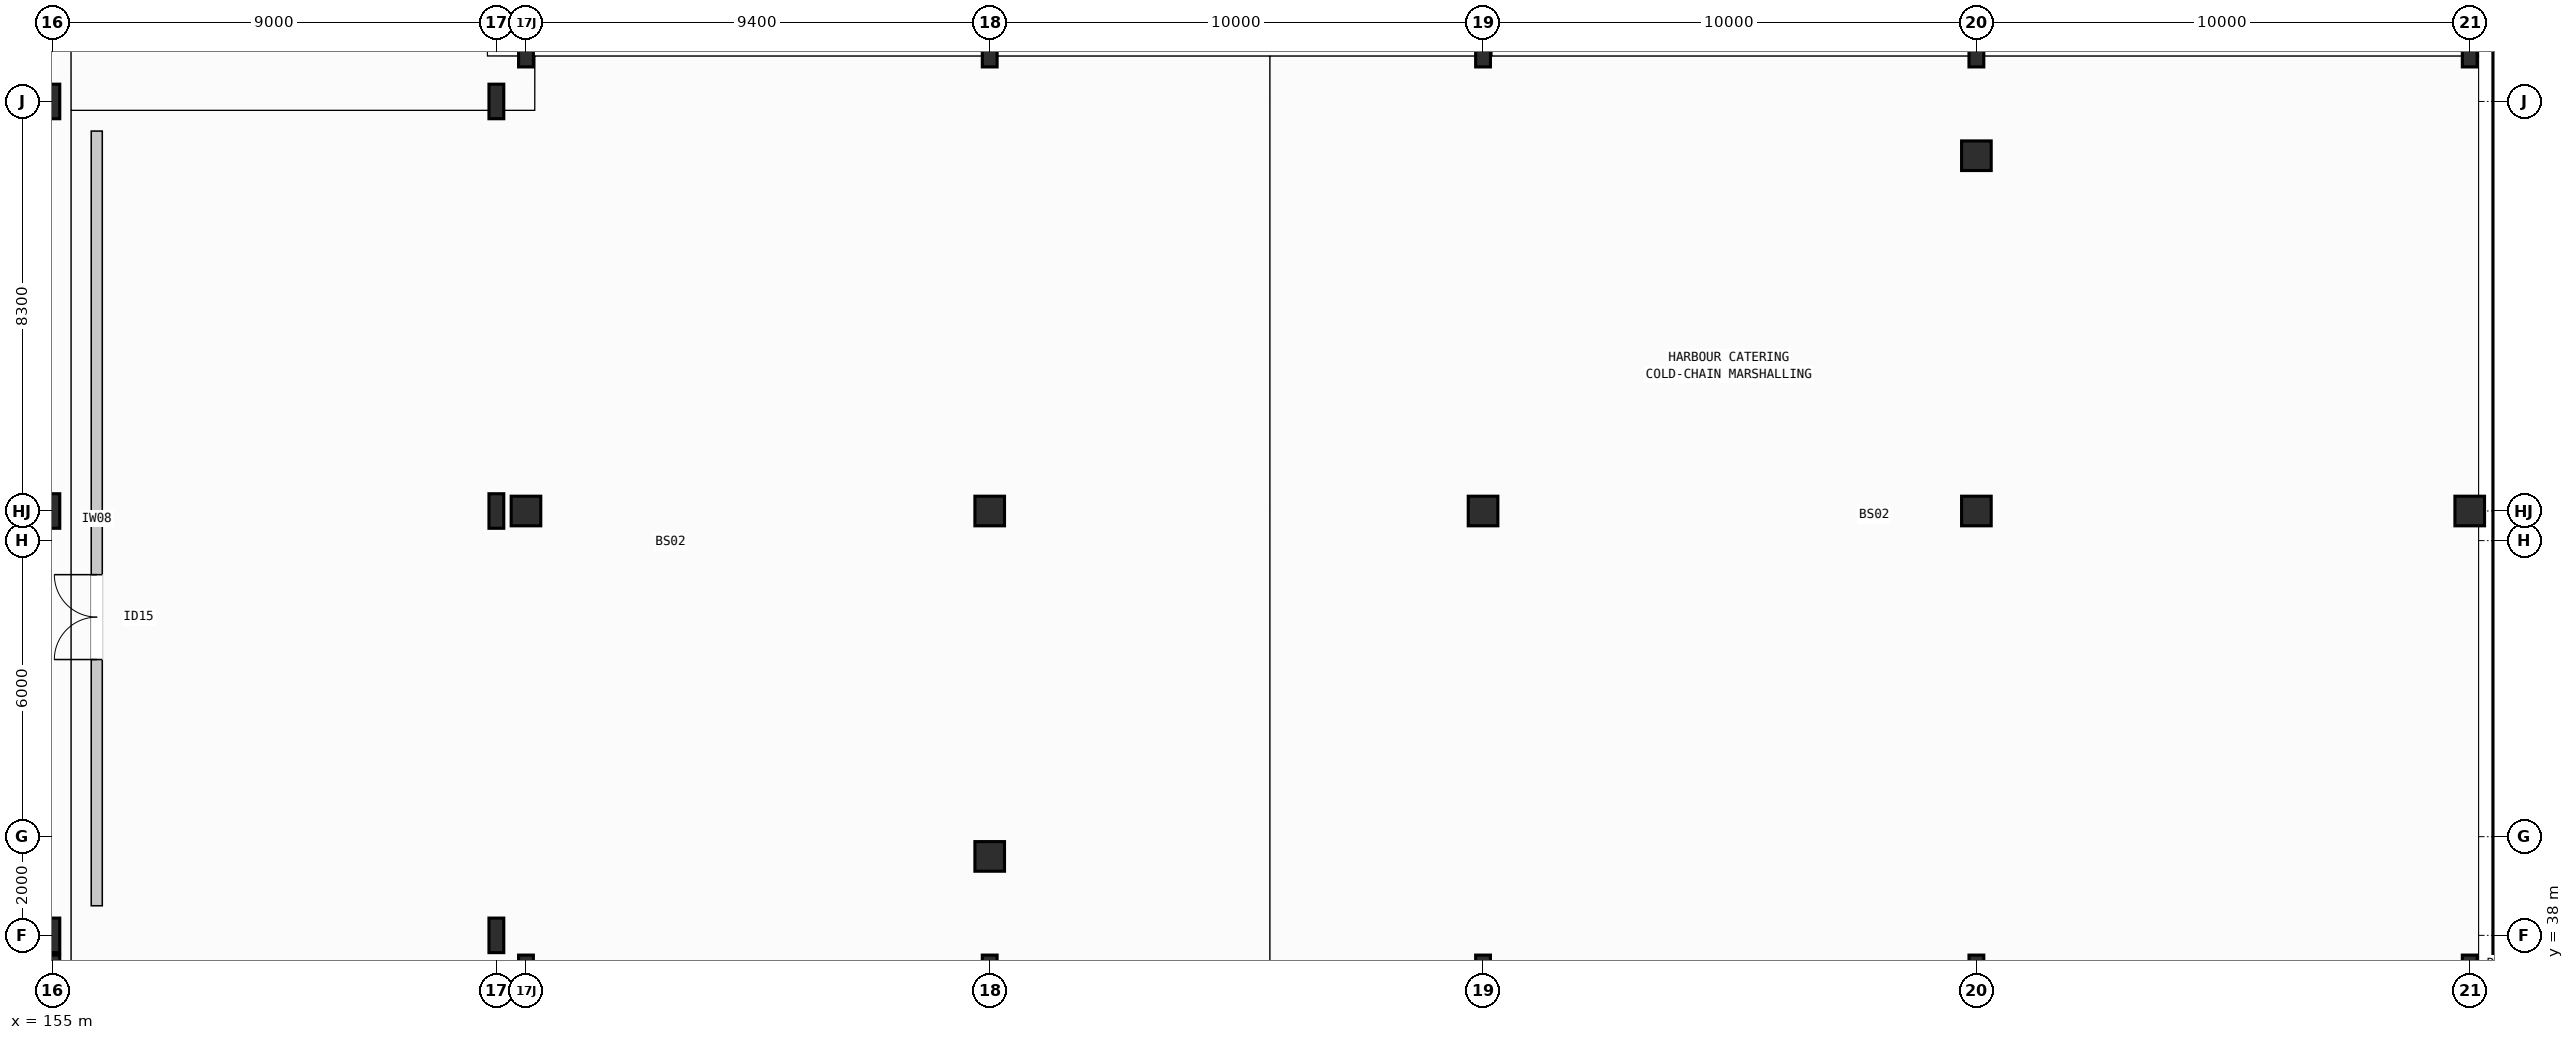
"""IFC4 building model, lengths in metres.
Left out: names, types, materials, properties, quantities, classifications, styles, units other than length and angle.
Written with IfcOpenShell. Run it as: python <this file> out.ifc"""

import sys

from ifc_helpers import new_model, si_unit, direction, frame, frame_2d, origin, origin_2d, place, context, subcontext, project, spatial, rectangle, i_section, extrude, element, fill, save


model = new_model("IFC4")
c1 = context("Model", 3, precision=1e-05, world=origin(), true_north=direction((0.0, 1.0)))
c2 = subcontext(c1, "Body", "Model", "MODEL_VIEW")
j1 = project(units=[si_unit("LENGTHUNIT", "METRE"), si_unit("PLANEANGLEUNIT", "RADIAN")], contexts=[c1])
p1 = place(None, origin())
s1 = spatial("IfcSite", under=j1, at=p1, CompositionType="ELEMENT")
p2 = place(p1, origin())
s2 = spatial("IfcBuilding", under=s1, at=p2, CompositionType="ELEMENT")
p3 = place(p2, frame((0.0, 0.0, -5.4)))
s3 = spatial("IfcBuildingStorey", under=s2, at=p3, CompositionType="ELEMENT", Elevation=-5.4)
p4 = place(p3, frame((155.0, 37.4, 0.0), z_axis=(0.0, 0.0, 1.0), x_axis=(1.0, 0.0, 0.0)))
e1 = element("IfcColumn", 1, at=p4, inside=s3, PredefinedType="COLUMN", context=c2, shape_type="SweptSolid", body=[
    extrude(i_section(OverallWidth=0.3, OverallDepth=0.4, WebThickness=0.013, FlangeThickness=0.024, FilletRadius=0.027, at=origin_2d()), origin(), (0.0, 0.0, 1.0), 5.4),
])
for number, where, z_axis, x_axis in (
    (2, (155.0, 38.0, 0.0), (0.0, 0.0, 1.0), (1.0, 0.0, 0.0)),
    (3, (155.0, 46.6, 0.0), (0.0, 0.0, 1.0), (1.0, 0.0, 0.0)),
    (4, (155.0, 54.9, 0.0), (0.0, 0.0, 1.0), (1.0, 0.0, 0.0)),
    (5, (164.0, 38.0, 0.0), (0.0, 0.0, 1.0), (1.0, 0.0, 0.0)),
    (6, (164.0, 46.6, 0.0), (0.0, 0.0, 1.0), (1.0, 0.0, 0.0)),
    (7, (164.0, 54.9, 0.0), (0.0, 0.0, 1.0), (1.0, 0.0, 0.0)),
):
    element("IfcColumn", number, at=place(p3, frame(where, z_axis=z_axis, x_axis=x_axis)), inside=s3, PredefinedType="COLUMN", context=c2, shape_type="SweptSolid", body=[
        extrude(i_section(OverallWidth=0.3, OverallDepth=0.7, WebThickness=0.017, FlangeThickness=0.032, FilletRadius=0.027, at=origin_2d()), origin(), (0.0, 0.0, 1.0), 5.4),
    ])
p5 = place(p3, frame((164.6, 37.4, 0.0), z_axis=(0.0, 0.0, 1.0), x_axis=(1.0, 0.0, 0.0)))
e8 = element("IfcColumn", 8, at=p5, inside=s3, PredefinedType="COLUMN", context=c2, shape_type="SweptSolid", body=[
    extrude(i_section(OverallWidth=0.3, OverallDepth=0.4, WebThickness=0.013, FlangeThickness=0.024, FilletRadius=0.027, at=origin_2d()), origin(), (0.0, 0.0, 1.0), 5.4),
])
p6 = place(p3, frame((164.6, 46.6, 0.0), z_axis=(0.0, 0.0, 1.0), x_axis=(1.0, 0.0, 0.0)))
e9 = element("IfcColumn", 9, at=p6, inside=s3, PredefinedType="COLUMN", context=c2, shape_type="SweptSolid", body=[
    extrude(rectangle(XDim=0.6, YDim=0.6, at=origin_2d()), origin(), (0.0, 0.0, 1.0), 5.4),
])
p7 = place(p3, frame((164.6, 56.0, 0.0), z_axis=(0.0, 0.0, 1.0), x_axis=(1.0, 0.0, 0.0)))
e10 = element("IfcColumn", 10, at=p7, inside=s3, PredefinedType="COLUMN", context=c2, shape_type="SweptSolid", body=[
    extrude(i_section(OverallWidth=0.3, OverallDepth=0.8, WebThickness=0.018, FlangeThickness=0.033, FilletRadius=0.03, at=origin_2d()), origin(), (0.0, 0.0, 1.0), 5.4),
])
p8 = place(p3, frame((174.0, 37.4, 0.0), z_axis=(0.0, 0.0, 1.0), x_axis=(1.0, 0.0, 0.0)))
e11 = element("IfcColumn", 11, at=p8, inside=s3, PredefinedType="COLUMN", context=c2, shape_type="SweptSolid", body=[
    extrude(i_section(OverallWidth=0.3, OverallDepth=0.4, WebThickness=0.013, FlangeThickness=0.024, FilletRadius=0.027, at=origin_2d()), origin(), (0.0, 0.0, 1.0), 5.4),
])
p9 = place(p3, frame((174.0, 39.6, 0.0), z_axis=(0.0, 0.0, 1.0), x_axis=(1.0, 0.0, 0.0)))
e12 = element("IfcColumn", 12, at=p9, inside=s3, PredefinedType="COLUMN", context=c2, shape_type="SweptSolid", body=[
    extrude(rectangle(XDim=0.6, YDim=0.6, at=origin_2d()), origin(), (0.0, 0.0, 1.0), 5.005),
])
p10 = place(p3, frame((174.0, 46.6, 0.0), z_axis=(0.0, 0.0, 1.0), x_axis=(1.0, 0.0, 0.0)))
e13 = element("IfcColumn", 13, at=p10, inside=s3, PredefinedType="COLUMN", context=c2, shape_type="SweptSolid", body=[
    extrude(rectangle(XDim=0.6, YDim=0.6, at=origin_2d()), origin(), (0.0, 0.0, 1.0), 5.4),
])
p11 = place(p3, frame((174.0, 56.0, 0.0), z_axis=(0.0, 0.0, 1.0), x_axis=(1.0, 0.0, 0.0)))
e14 = element("IfcColumn", 14, at=p11, inside=s3, PredefinedType="COLUMN", context=c2, shape_type="SweptSolid", body=[
    extrude(i_section(OverallWidth=0.3, OverallDepth=0.8, WebThickness=0.018, FlangeThickness=0.033, FilletRadius=0.03, at=origin_2d()), origin(), (0.0, 0.0, 1.0), 5.4),
])
p12 = place(p3, frame((184.0, 37.4, 0.0), z_axis=(0.0, 0.0, 1.0), x_axis=(1.0, 0.0, 0.0)))
e15 = element("IfcColumn", 15, at=p12, inside=s3, PredefinedType="COLUMN", context=c2, shape_type="SweptSolid", body=[
    extrude(i_section(OverallWidth=0.3, OverallDepth=0.4, WebThickness=0.013, FlangeThickness=0.024, FilletRadius=0.027, at=origin_2d()), origin(), (0.0, 0.0, 1.0), 5.4),
])
p13 = place(p3, frame((184.0, 46.6, 0.0), z_axis=(0.0, 0.0, 1.0), x_axis=(1.0, 0.0, 0.0)))
e16 = element("IfcColumn", 16, at=p13, inside=s3, PredefinedType="COLUMN", context=c2, shape_type="SweptSolid", body=[
    extrude(rectangle(XDim=0.6, YDim=0.6, at=origin_2d()), origin(), (0.0, 0.0, 1.0), 5.4),
])
p14 = place(p3, frame((184.0, 56.0, 0.0), z_axis=(0.0, 0.0, 1.0), x_axis=(1.0, 0.0, 0.0)))
e17 = element("IfcColumn", 17, at=p14, inside=s3, PredefinedType="COLUMN", context=c2, shape_type="SweptSolid", body=[
    extrude(i_section(OverallWidth=0.3, OverallDepth=0.8, WebThickness=0.018, FlangeThickness=0.033, FilletRadius=0.03, at=origin_2d()), origin(), (0.0, 0.0, 1.0), 5.4),
])
p15 = place(p3, frame((194.0, 37.4, 0.0), z_axis=(0.0, 0.0, 1.0), x_axis=(1.0, 0.0, 0.0)))
e18 = element("IfcColumn", 18, at=p15, inside=s3, PredefinedType="COLUMN", context=c2, shape_type="SweptSolid", body=[
    extrude(i_section(OverallWidth=0.3, OverallDepth=0.4, WebThickness=0.013, FlangeThickness=0.024, FilletRadius=0.027, at=origin_2d()), origin(), (0.0, 0.0, 1.0), 5.4),
])
p16 = place(p3, frame((194.0, 46.6, 0.0), z_axis=(0.0, 0.0, 1.0), x_axis=(1.0, 0.0, 0.0)))
e19 = element("IfcColumn", 19, at=p16, inside=s3, PredefinedType="COLUMN", context=c2, shape_type="SweptSolid", body=[
    extrude(rectangle(XDim=0.6, YDim=0.6, at=origin_2d()), origin(), (0.0, 0.0, 1.0), 5.4),
])
p17 = place(p3, frame((194.0, 53.8, 0.0), z_axis=(0.0, 0.0, 1.0), x_axis=(1.0, 0.0, 0.0)))
e20 = element("IfcColumn", 20, at=p17, inside=s3, PredefinedType="COLUMN", context=c2, shape_type="SweptSolid", body=[
    extrude(rectangle(XDim=0.6, YDim=0.6, at=origin_2d()), origin(), (0.0, 0.0, 1.0), 5.005),
])
p18 = place(p3, frame((194.0, 56.0, 0.0), z_axis=(0.0, 0.0, 1.0), x_axis=(1.0, 0.0, 0.0)))
e21 = element("IfcColumn", 21, at=p18, inside=s3, PredefinedType="COLUMN", context=c2, shape_type="SweptSolid", body=[
    extrude(i_section(OverallWidth=0.3, OverallDepth=0.8, WebThickness=0.018, FlangeThickness=0.033, FilletRadius=0.03, at=origin_2d()), origin(), (0.0, 0.0, 1.0), 5.4),
])
p19 = place(p3, frame((204.0, 37.4, 0.0), z_axis=(0.0, 0.0, 1.0), x_axis=(1.0, 0.0, 0.0)))
e22 = element("IfcColumn", 22, at=p19, inside=s3, PredefinedType="COLUMN", context=c2, shape_type="SweptSolid", body=[
    extrude(i_section(OverallWidth=0.3, OverallDepth=0.4, WebThickness=0.013, FlangeThickness=0.024, FilletRadius=0.027, at=origin_2d()), origin(), (0.0, 0.0, 1.0), 5.4),
])
p20 = place(p3, frame((204.0, 46.6, 0.0), z_axis=(0.0, 0.0, 1.0), x_axis=(1.0, 0.0, 0.0)))
e23 = element("IfcColumn", 23, at=p20, inside=s3, PredefinedType="COLUMN", context=c2, shape_type="SweptSolid", body=[
    extrude(rectangle(XDim=0.6, YDim=0.6, at=origin_2d()), origin(), (0.0, 0.0, 1.0), 5.4),
])
p21 = place(p3, frame((204.0, 56.0, 0.0), z_axis=(0.0, 0.0, 1.0), x_axis=(1.0, 0.0, 0.0)))
e24 = element("IfcColumn", 24, at=p21, inside=s3, PredefinedType="COLUMN", context=c2, shape_type="SweptSolid", body=[
    extrude(i_section(OverallWidth=0.3, OverallDepth=0.8, WebThickness=0.018, FlangeThickness=0.033, FilletRadius=0.03, at=origin_2d()), origin(), (0.0, 0.0, 1.0), 5.4),
])
p22 = place(p3, frame((204.65, 134.478, 0.0), z_axis=(0.0, 0.0, 1.0), x_axis=(0.0, -1.0, 0.0)))
e25 = element("IfcWall", 25, at=p22, inside=s3, PredefinedType="SOLIDWALL", context=c2, shape_type="SweptSolid", body=[
    extrude(rectangle(XDim=118.956, YDim=0.36, at=frame_2d((59.478, 0.0))), origin(), (0.0, 0.0, 1.0), 5.048),
])
p23 = place(p3, frame((155.9, 38.6, 0.0), z_axis=(0.0, 0.0, 1.0), x_axis=(0.0, 1.0, 0.0)))
e26 = element("IfcWall", 26, at=p23, inside=s3, PredefinedType="PARTITIONING", context=c2, shape_type="SweptSolid", body=[
    extrude(rectangle(XDim=15.7, YDim=0.224, at=frame_2d((7.85, 0.0))), origin(), (0.0, 0.0, 1.0), 4.4),
])
p24 = place(p23, frame((4.99, 0.0, 0.0)))
e27 = element("IfcOpeningElement", 27, at=p24, cuts=e26, PredefinedType="OPENING", context=c2, shape_type="SweptSolid", body=[
    extrude(rectangle(XDim=1.72, YDim=2.28, at=frame_2d((0.86, 1.14))), frame((0.0, 0.122, 0.0), z_axis=(0.0, -1.0, 0.0), x_axis=(1.0, 0.0, 0.0)), (0.0, 0.0, 1.0), 0.244),
])
p25 = place(p24, origin())
e28 = element("IfcDoor", 28, at=p25, inside=s3, OperationType="DOUBLE_DOOR_SINGLE_SWING", PredefinedType="DOOR", context=c2, shape_type="SweptSolid", body=[
    extrude(rectangle(XDim=1.72, YDim=2.28, at=frame_2d((0.86, 1.14))), frame((0.0, 0.025, 0.0), z_axis=(0.0, -1.0, 0.0), x_axis=(1.0, 0.0, 0.0)), (0.0, 0.0, 1.0), 0.05),
])
fill(e27, e28)
save(model, sys.argv[1])
